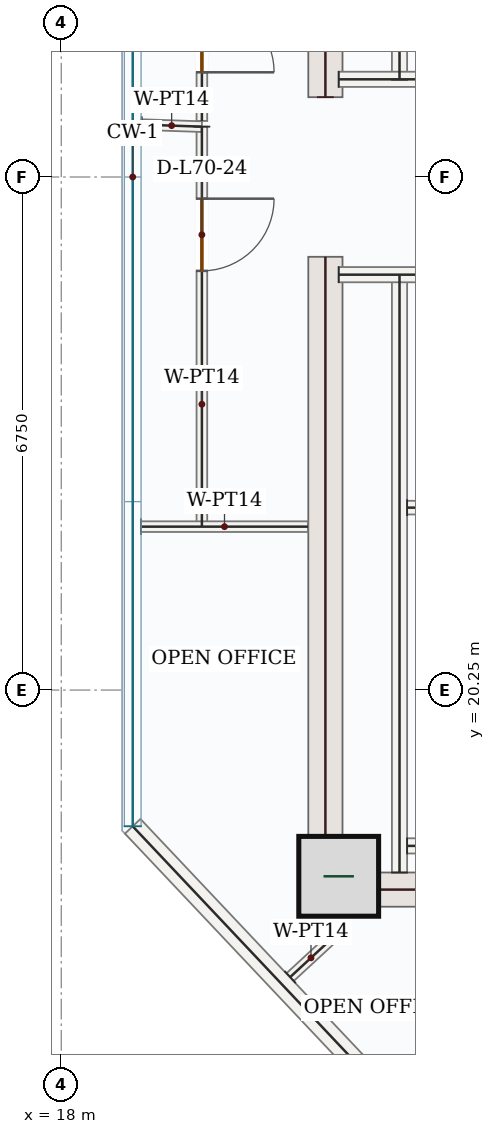
"""IFC4 building model, lengths in metres.
Left out: names, types, materials, properties, quantities, classifications, styles, units other than length and angle.
Written with IfcOpenShell. Run it as: python <this file> out.ifc"""

import sys

from ifc_helpers import new_model, si_unit, direction, frame, frame_2d, origin, origin_2d, place, context, subcontext, project, spatial, rectangle, extrude, source, transform, mapped, element, fill, save


model = new_model("IFC4")
c1 = context("Model", 3, precision=1e-05, world=origin(), true_north=direction((0.0, 1.0)))
c2 = subcontext(c1, "Body", "Model", "MODEL_VIEW")
j1 = project(units=[si_unit("LENGTHUNIT", "METRE"), si_unit("PLANEANGLEUNIT", "RADIAN")], contexts=[c1])
p1 = place(None, origin())
s1 = spatial("IfcSite", under=j1, at=p1, CompositionType="ELEMENT")
p2 = place(p1, origin())
s2 = spatial("IfcBuilding", under=s1, at=p2, CompositionType="ELEMENT")
p3 = place(p2, frame((0.0, 0.0, 291.6)))
s3 = spatial("IfcBuildingStorey", under=s2, at=p3, CompositionType="ELEMENT", Elevation=291.6)
m1 = source(origin(), c2, "Body", "SweptSolid", [
    extrude(rectangle(XDim=8.55, YDim=0.45, at=frame_2d((4.275, 0.0))), origin(), (0.0, 0.0, 1.0), 3.5),
])
for number, where, z_axis, x_axis in (
    (1, (21.475, 17.4, 0.0), (0.0, 0.0, 1.0), (0.0, 1.0, 0.0)),
    (2, (21.475, 28.05, 0.0), (0.0, 0.0, 1.0), (0.0, 1.0, 0.0)),
):
    element("IfcWall", number, at=place(p3, frame(where, z_axis=z_axis, x_axis=x_axis)), inside=s3, PredefinedType="SHEAR", context=c2, shape_type="MappedRepresentation", body=[
        mapped(m1, transform((0.0, 0.0, 0.0), x_axis=(1.0, 0.0, 0.0), y_axis=(0.0, 1.0, 0.0), z_axis=(0.0, 0.0, 1.0), scale=1.0)),
    ])
m2 = source(origin(), c2, "Body", "SweptSolid", [
    extrude(rectangle(XDim=7.1, YDim=0.45, at=frame_2d((3.55, 0.0))), origin(), (0.0, 0.0, 1.0), 3.5),
])
p4 = place(p3, frame((21.7, 17.625, 0.0), z_axis=(0.0, 0.0, 1.0), x_axis=(1.0, 0.0, 0.0)))
e3 = element("IfcWall", 3, at=p4, inside=s3, PredefinedType="SHEAR", context=c2, shape_type="MappedRepresentation", body=[
    mapped(m2, transform((0.0, 0.0, 0.0), x_axis=(1.0, 0.0, 0.0), y_axis=(0.0, 1.0, 0.0), z_axis=(0.0, 0.0, 1.0), scale=1.0)),
])
m3 = source(origin(), c2, "Body", "SweptSolid", [
    extrude(rectangle(XDim=1.05, YDim=1.05, at=origin_2d()), origin(), (0.0, 0.0, 1.0), 3.75),
])
p5 = place(p3, frame((21.65, 17.8, 0.0), z_axis=(0.0, 0.0, 1.0), x_axis=(1.0, 0.0, 0.0)))
e4 = element("IfcColumn", 4, at=p5, inside=s3, PredefinedType="COLUMN", context=c2, shape_type="MappedRepresentation", body=[
    mapped(m3, transform((0.0, 0.0, 0.0), x_axis=(1.0, 0.0, 0.0), y_axis=(0.0, 1.0, 0.0), z_axis=(0.0, 0.0, 1.0), scale=1.0)),
])
m4 = source(origin(), c2, "Body", "SweptSolid", [
    extrude(rectangle(XDim=10.274, YDim=0.28, at=frame_2d((5.137, 0.0))), origin(), (0.0, 0.0, 1.0), 3.5),
])
p6 = place(p3, frame((25.992, 10.987, 0.0), z_axis=(0.0, 0.0, 1.0), x_axis=(-0.68643580465, 0.727190405667, 0.0)))
e5 = element("IfcWall", 5, at=p6, inside=s3, PredefinedType="SOLIDWALL", context=c2, shape_type="MappedRepresentation", body=[
    mapped(m4, transform((0.0, 0.0, 0.0), x_axis=(1.0, 0.0, 0.0), y_axis=(0.0, 1.0, 0.0), z_axis=(0.0, 0.0, 1.0), scale=1.0)),
])
m5 = source(origin(), c2, "Body", "SweptSolid", [
    extrude(rectangle(XDim=7.87, YDim=0.2, at=frame_2d((3.935, 0.0))), origin(), (0.0, 0.0, 1.0), 3.5),
])
for number, where, z_axis, x_axis in (
    (6, (22.45, 17.85, 0.0), (0.0, 0.0, 1.0), (0.0, 1.0, 0.0)),
    (7, (22.45, 28.28, 0.0), (0.0, 0.0, 1.0), (0.0, 1.0, 0.0)),
):
    element("IfcWall", number, at=place(p3, frame(where, z_axis=z_axis, x_axis=x_axis)), inside=s3, PredefinedType="SOLIDWALL", context=c2, shape_type="MappedRepresentation", body=[
        mapped(m5, transform((0.0, 0.0, 0.0), x_axis=(1.0, 0.0, 0.0), y_axis=(0.0, 1.0, 0.0), z_axis=(0.0, 0.0, 1.0), scale=1.0)),
    ])
m6 = source(origin(), c2, "Body", "SweptSolid", [
    extrude(rectangle(XDim=4.25, YDim=0.2, at=frame_2d((2.125, 0.0))), origin(), (0.0, 0.0, 1.0), 3.5),
])
for number, where, z_axis, x_axis in (
    (8, (21.65, 25.715, 0.0), (0.0, 0.0, 1.0), (1.0, 0.0, 0.0)),
    (9, (21.65, 28.285, 0.0), (0.0, 0.0, 1.0), (1.0, 0.0, 0.0)),
):
    element("IfcWall", number, at=place(p3, frame(where, z_axis=z_axis, x_axis=x_axis)), inside=s3, PredefinedType="SOLIDWALL", context=c2, shape_type="MappedRepresentation", body=[
        mapped(m6, transform((0.0, 0.0, 0.0), x_axis=(1.0, 0.0, 0.0), y_axis=(0.0, 1.0, 0.0), z_axis=(0.0, 0.0, 1.0), scale=1.0)),
    ])
m7 = source(origin(), c2, "Body", "SweptSolid", [
    extrude(rectangle(XDim=3.25, YDim=0.2, at=frame_2d((1.625, 0.0))), origin(), (0.0, 0.0, 1.0), 3.5),
])
p7 = place(p3, frame((22.55, 18.2, 0.0), z_axis=(0.0, 0.0, 1.0), x_axis=(1.0, 0.0, 0.0)))
e10 = element("IfcWall", 10, at=p7, inside=s3, PredefinedType="SOLIDWALL", context=c2, shape_type="MappedRepresentation", body=[
    mapped(m7, transform((0.0, 0.0, 0.0), x_axis=(1.0, 0.0, 0.0), y_axis=(0.0, 1.0, 0.0), z_axis=(0.0, 0.0, 1.0), scale=1.0)),
])
m8 = source(origin(), c2, "Body", "SweptSolid", [
    extrude(rectangle(XDim=3.25, YDim=0.18, at=frame_2d((1.625, 0.0))), origin(), (0.0, 0.0, 1.0), 3.5),
])
p8 = place(p3, frame((22.55, 22.65, 0.0), z_axis=(0.0, 0.0, 1.0), x_axis=(1.0, 0.0, 0.0)))
e11 = element("IfcWall", 11, at=p8, inside=s3, PredefinedType="PARTITIONING", context=c2, shape_type="MappedRepresentation", body=[
    mapped(m8, transform((0.0, 0.0, 0.0), x_axis=(1.0, 0.0, 0.0), y_axis=(0.0, 1.0, 0.0), z_axis=(0.0, 0.0, 1.0), scale=1.0)),
])
m9 = source(origin(), c2, "Body", "SweptSolid", [
    extrude(rectangle(XDim=0.745, YDim=0.14, at=frame_2d((0.373, 0.0))), origin(), (0.0, 0.0, 1.0), 3.5),
])
p9 = place(p3, frame((21.012, 16.474, 0.0), z_axis=(0.0, 0.0, 1.0), x_axis=(0.734262819455, 0.678865312095, 0.0)))
e12 = element("IfcWall", 12, at=p9, inside=s3, PredefinedType="PARTITIONING", context=c2, shape_type="MappedRepresentation", body=[
    mapped(m9, transform((0.0, 0.0, 0.0), x_axis=(1.0, 0.0, 0.0), y_axis=(0.0, 1.0, 0.0), z_axis=(0.0, 0.0, 1.0), scale=1.0)),
])
p10 = place(p3, frame((19.85, 27.662, 0.0), z_axis=(0.0, 0.0, 1.0), x_axis=(0.0, -1.0, 0.0)))
e13 = element("IfcWall", 13, at=p10, inside=s3, PredefinedType="PARTITIONING", context=c2, shape_type="SweptSolid", body=[
    extrude(rectangle(XDim=5.256, YDim=0.14, at=frame_2d((2.628, 0.0))), origin(), (0.0, 0.0, 1.0), 3.5),
])
p11 = place(p10, frame((0.948, 0.0, 0.0)))
e14 = element("IfcOpeningElement", 14, at=p11, cuts=e13, PredefinedType="OPENING", context=c2, shape_type="SweptSolid", body=[
    extrude(rectangle(XDim=0.95, YDim=2.15, at=frame_2d((0.475, 1.075))), frame((0.0, 0.08, 0.0), z_axis=(0.0, -1.0, 0.0), x_axis=(1.0, 0.0, 0.0)), (0.0, 0.0, 1.0), 0.16),
])
m10 = source(origin(), c2, "Body", "SweptSolid", [
    extrude(rectangle(XDim=2.195, YDim=0.14, at=frame_2d((1.098, 0.0))), origin(), (0.0, 0.0, 1.0), 3.5),
])
p12 = place(p3, frame((19.05, 22.4, 0.0), z_axis=(0.0, 0.0, 1.0), x_axis=(1.0, 0.0, 0.0)))
e15 = element("IfcWall", 15, at=p12, inside=s3, PredefinedType="PARTITIONING", context=c2, shape_type="MappedRepresentation", body=[
    mapped(m10, transform((0.0, 0.0, 0.0), x_axis=(1.0, 0.0, 0.0), y_axis=(0.0, 1.0, 0.0), z_axis=(0.0, 0.0, 1.0), scale=1.0)),
])
m11 = source(origin(), c2, "Body", "SweptSolid", [
    extrude(rectangle(XDim=0.795, YDim=0.14, at=frame_2d((0.397, 0.0))), origin(), (0.0, 0.0, 1.0), 3.5),
])
p13 = place(p3, frame((19.055, 27.689, 0.0), z_axis=(0.0, 0.0, 1.0), x_axis=(0.999418697686, -0.034092033019, 0.0)))
e16 = element("IfcWall", 16, at=p13, inside=s3, PredefinedType="PARTITIONING", context=c2, shape_type="MappedRepresentation", body=[
    mapped(m11, transform((0.0, 0.0, 0.0), x_axis=(1.0, 0.0, 0.0), y_axis=(0.0, 1.0, 0.0), z_axis=(0.0, 0.0, 1.0), scale=1.0)),
])
p14 = place(p3, frame((19.851, 31.598, 0.0), z_axis=(0.0, 0.0, 1.0), x_axis=(-0.000316215517, -0.999999950004, 0.0)))
e17 = element("IfcWall", 17, at=p14, inside=s3, PredefinedType="PARTITIONING", context=c2, shape_type="SweptSolid", body=[
    extrude(rectangle(XDim=3.86, YDim=0.14, at=frame_2d((1.93, 0.0))), origin(), (0.0, 0.0, 1.0), 3.5),
])
p15 = place(p14, frame((2.27, 0.0, 0.0)))
e18 = element("IfcOpeningElement", 18, at=p15, cuts=e17, PredefinedType="OPENING", context=c2, shape_type="SweptSolid", body=[
    extrude(rectangle(XDim=0.95, YDim=2.15, at=frame_2d((0.475, 1.075))), frame((0.0, 0.08, 0.0), z_axis=(0.0, -1.0, 0.0), x_axis=(1.0, 0.0, 0.0)), (0.0, 0.0, 1.0), 0.16),
])
m12 = source(origin(), c2, "Body", "SweptSolid", [
    extrude(rectangle(XDim=0.95, YDim=2.15, at=frame_2d((0.475, 1.075))), frame((0.0, 0.025, 0.0), z_axis=(0.0, -1.0, 0.0), x_axis=(1.0, 0.0, 0.0)), (0.0, 0.0, 1.0), 0.05),
])
p16 = place(p15, origin())
e19 = element("IfcDoor", 19, at=p16, inside=s3, OperationType="SINGLE_SWING_RIGHT", PredefinedType="DOOR", context=c2, shape_type="MappedRepresentation", body=[
    mapped(m12, transform((0.0, 0.0, 0.0), x_axis=(1.0, 0.0, 0.0), y_axis=(0.0, 1.0, 0.0), z_axis=(0.0, 0.0, 1.0), scale=1.0)),
])
fill(e18, e19)
p17 = place(p11, origin())
e20 = element("IfcDoor", 20, at=p17, inside=s3, OperationType="SINGLE_SWING_LEFT", PredefinedType="DOOR", context=c2, shape_type="MappedRepresentation", body=[
    mapped(m12, transform((0.0, 0.0, 0.0), x_axis=(1.0, 0.0, 0.0), y_axis=(0.0, 1.0, 0.0), z_axis=(0.0, 0.0, 1.0), scale=1.0)),
])
fill(e14, e20)
save(model, sys.argv[1])
